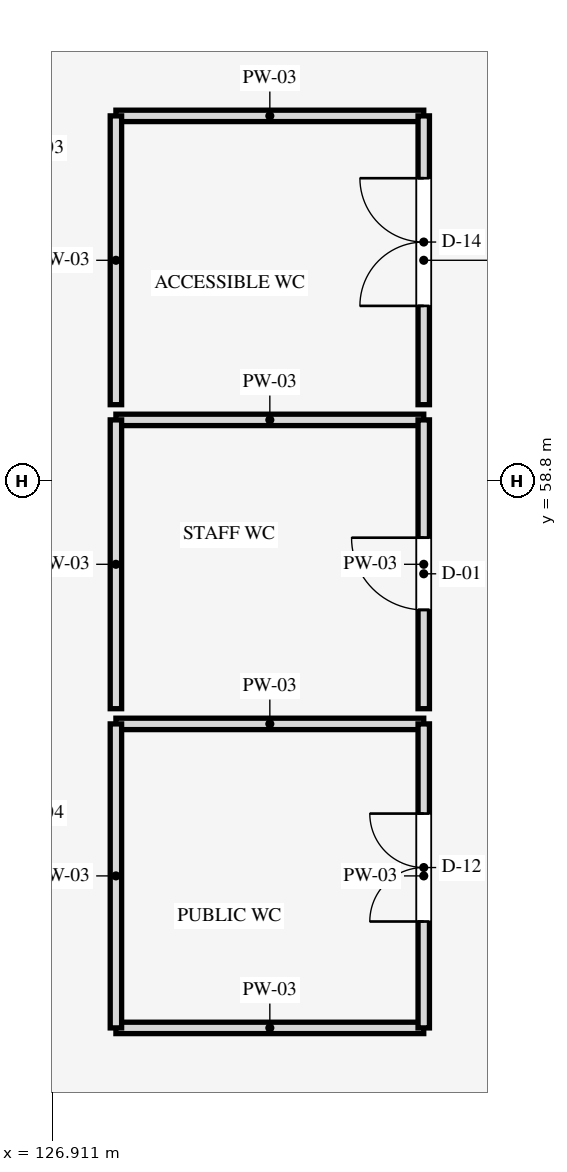
"""IFC4 building model, lengths in metres.
Left out: names, types, materials, properties, quantities, classifications, styles, units other than length and angle.
Written with IfcOpenShell. Run it as: python <this file> out.ifc"""

import sys

from ifc_helpers import new_model, si_unit, direction, frame, frame_2d, origin, place, context, subcontext, project, spatial, rectangle, extrude, element, fill, save


model = new_model("IFC4")
c1 = context("Model", 3, precision=1e-05, world=origin(), true_north=direction((0.0, 1.0)))
c2 = subcontext(c1, "Body", "Model", "MODEL_VIEW")
j1 = project(units=[si_unit("LENGTHUNIT", "METRE"), si_unit("PLANEANGLEUNIT", "RADIAN")], contexts=[c1])
p1 = place(None, origin())
s1 = spatial("IfcSite", under=j1, at=p1, CompositionType="ELEMENT")
p2 = place(p1, origin())
s2 = spatial("IfcBuilding", under=s1, at=p2, CompositionType="ELEMENT")
p3 = place(p2, frame((0.0, 0.0, 36.3)))
s3 = spatial("IfcBuildingStorey", under=s2, at=p3, CompositionType="ELEMENT", Elevation=36.3)
for number, where, z_axis, x_axis in (
    (1, (127.75, 51.6, 0.0), (0.0, 0.0, 1.0), (1.0, 0.0, 0.0)),
    (2, (127.75, 55.6, 0.0), (0.0, 0.0, 1.0), (1.0, 0.0, 0.0)),
):
    element("IfcWall", number, at=place(p3, frame(where, z_axis=z_axis, x_axis=x_axis)), inside=s3, PredefinedType="PARTITIONING", context=c2, shape_type="SweptSolid", body=[
        extrude(rectangle(XDim=4.05, YDim=0.15, at=frame_2d((2.025, 0.0))), origin(), (0.0, 0.0, 1.0), 3.24),
    ])
p4 = place(p3, frame((127.75, 51.6, 0.0), z_axis=(0.0, 0.0, 1.0), x_axis=(0.0, 1.0, 0.0)))
e3 = element("IfcWall", 3, at=p4, inside=s3, PredefinedType="PARTITIONING", context=c2, shape_type="SweptSolid", body=[
    extrude(rectangle(XDim=4.0, YDim=0.15, at=frame_2d((2.0, 0.0))), origin(), (0.0, 0.0, 1.0), 3.24),
])
p5 = place(p3, frame((131.8, 51.6, 0.0), z_axis=(0.0, 0.0, 1.0), x_axis=(0.0, 1.0, 0.0)))
e4 = element("IfcWall", 4, at=p5, inside=s3, PredefinedType="PARTITIONING", context=c2, shape_type="SweptSolid", body=[
    extrude(rectangle(XDim=4.0, YDim=0.15, at=frame_2d((2.0, 0.0))), origin(), (0.0, 0.0, 1.0), 3.24),
])
p6 = place(p5, frame((1.4, 0.0, 0.0)))
e5 = element("IfcOpeningElement", 5, at=p6, cuts=e4, PredefinedType="OPENING", context=c2, shape_type="SweptSolid", body=[
    extrude(rectangle(XDim=1.42, YDim=2.18, at=frame_2d((0.71, 1.09))), frame((0.0, 0.085, 0.0), z_axis=(0.0, -1.0, 0.0), x_axis=(1.0, 0.0, 0.0)), (0.0, 0.0, 1.0), 0.17),
])
p7 = place(p3, frame((127.75, 59.6, 0.0), z_axis=(0.0, 0.0, 1.0), x_axis=(1.0, 0.0, 0.0)))
e6 = element("IfcWall", 6, at=p7, inside=s3, PredefinedType="PARTITIONING", context=c2, shape_type="SweptSolid", body=[
    extrude(rectangle(XDim=4.05, YDim=0.15, at=frame_2d((2.025, 0.0))), origin(), (0.0, 0.0, 1.0), 3.24),
])
p8 = place(p3, frame((127.75, 55.8, 0.0), z_axis=(0.0, 0.0, 1.0), x_axis=(0.0, 1.0, 0.0)))
e7 = element("IfcWall", 7, at=p8, inside=s3, PredefinedType="PARTITIONING", context=c2, shape_type="SweptSolid", body=[
    extrude(rectangle(XDim=3.8, YDim=0.15, at=frame_2d((1.9, 0.0))), origin(), (0.0, 0.0, 1.0), 3.24),
])
p9 = place(p3, frame((131.8, 55.8, 0.0), z_axis=(0.0, 0.0, 1.0), x_axis=(0.0, 1.0, 0.0)))
e8 = element("IfcWall", 8, at=p9, inside=s3, PredefinedType="PARTITIONING", context=c2, shape_type="SweptSolid", body=[
    extrude(rectangle(XDim=3.8, YDim=0.15, at=frame_2d((1.9, 0.0))), origin(), (0.0, 0.0, 1.0), 3.24),
])
p10 = place(p9, frame((1.3, 0.0, 0.0)))
e9 = element("IfcOpeningElement", 9, at=p10, cuts=e8, PredefinedType="OPENING", context=c2, shape_type="SweptSolid", body=[
    extrude(rectangle(XDim=0.95, YDim=2.1, at=frame_2d((0.475, 1.05))), frame((0.0, 0.085, 0.0), z_axis=(0.0, -1.0, 0.0), x_axis=(1.0, 0.0, 0.0)), (0.0, 0.0, 1.0), 0.17),
])
p11 = place(p3, frame((127.75, 63.6, 0.0), z_axis=(0.0, 0.0, 1.0), x_axis=(1.0, 0.0, 0.0)))
e10 = element("IfcWall", 10, at=p11, inside=s3, PredefinedType="PARTITIONING", context=c2, shape_type="SweptSolid", body=[
    extrude(rectangle(XDim=4.05, YDim=0.15, at=frame_2d((2.025, 0.0))), origin(), (0.0, 0.0, 1.0), 3.24),
])
p12 = place(p3, frame((127.75, 59.8, 0.0), z_axis=(0.0, 0.0, 1.0), x_axis=(0.0, 1.0, 0.0)))
e11 = element("IfcWall", 11, at=p12, inside=s3, PredefinedType="PARTITIONING", context=c2, shape_type="SweptSolid", body=[
    extrude(rectangle(XDim=3.8, YDim=0.15, at=frame_2d((1.9, 0.0))), origin(), (0.0, 0.0, 1.0), 3.24),
])
p13 = place(p3, frame((131.8, 59.8, 0.0), z_axis=(0.0, 0.0, 1.0), x_axis=(0.0, 1.0, 0.0)))
e12 = element("IfcWall", 12, at=p13, inside=s3, PredefinedType="PARTITIONING", context=c2, shape_type="SweptSolid", body=[
    extrude(rectangle(XDim=3.8, YDim=0.15, at=frame_2d((1.9, 0.0))), origin(), (0.0, 0.0, 1.0), 3.24),
])
p14 = place(p13, frame((1.3, 0.0, 0.0)))
e13 = element("IfcOpeningElement", 13, at=p14, cuts=e12, PredefinedType="OPENING", context=c2, shape_type="SweptSolid", body=[
    extrude(rectangle(XDim=1.68, YDim=2.24, at=frame_2d((0.84, 1.12))), frame((0.0, 0.085, 0.0), z_axis=(0.0, -1.0, 0.0), x_axis=(1.0, 0.0, 0.0)), (0.0, 0.0, 1.0), 0.17),
])
p15 = place(p6, origin())
e14 = element("IfcDoor", 14, at=p15, inside=s3, OperationType="DOUBLE_DOOR_SINGLE_SWING", PredefinedType="DOOR", context=c2, shape_type="SweptSolid", body=[
    extrude(rectangle(XDim=1.42, YDim=2.18, at=frame_2d((0.71, 1.09))), frame((0.0, 0.025, 0.0), z_axis=(0.0, -1.0, 0.0), x_axis=(1.0, 0.0, 0.0)), (0.0, 0.0, 1.0), 0.05),
])
fill(e5, e14)
p16 = place(p10, origin())
e15 = element("IfcDoor", 15, at=p16, inside=s3, OperationType="SINGLE_SWING_RIGHT", PredefinedType="DOOR", context=c2, shape_type="SweptSolid", body=[
    extrude(rectangle(XDim=0.95, YDim=2.1, at=frame_2d((0.475, 1.05))), frame((0.0, 0.025, 0.0), z_axis=(0.0, -1.0, 0.0), x_axis=(1.0, 0.0, 0.0)), (0.0, 0.0, 1.0), 0.05),
])
fill(e9, e15)
p17 = place(p14, origin())
e16 = element("IfcDoor", 16, at=p17, inside=s3, OperationType="DOUBLE_DOOR_SINGLE_SWING", PredefinedType="DOOR", context=c2, shape_type="SweptSolid", body=[
    extrude(rectangle(XDim=1.68, YDim=2.24, at=frame_2d((0.84, 1.12))), frame((0.0, 0.025, 0.0), z_axis=(0.0, -1.0, 0.0), x_axis=(1.0, 0.0, 0.0)), (0.0, 0.0, 1.0), 0.05),
])
fill(e13, e16)
save(model, sys.argv[1])
